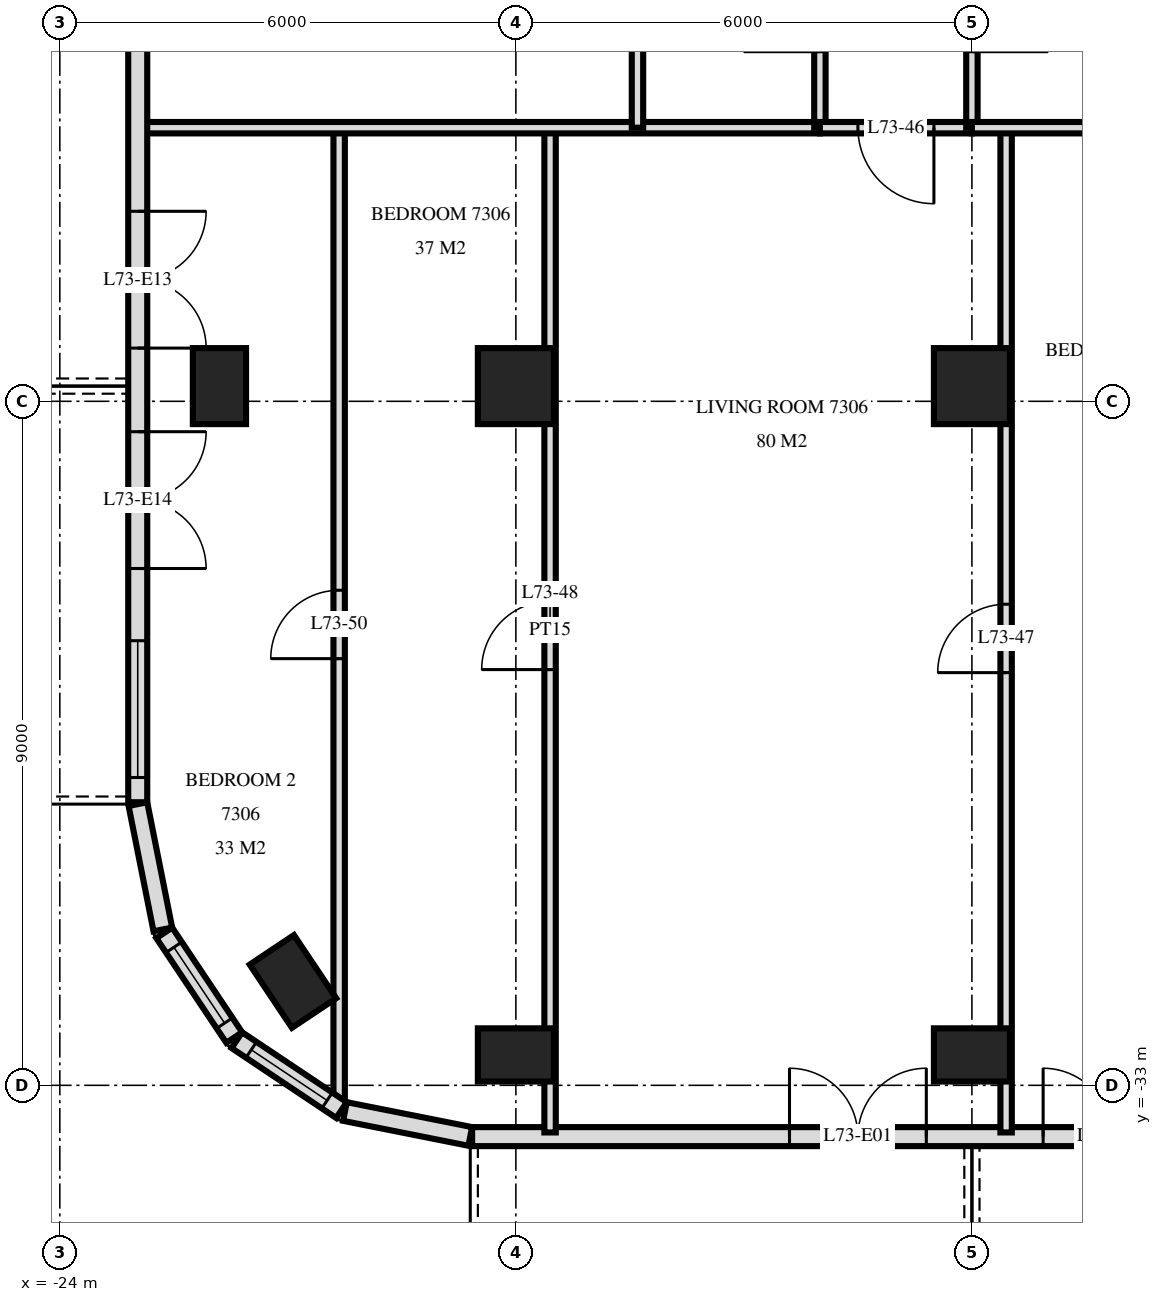
"""IFC4 building model, lengths in metres.
Left out: names, types, materials, properties, quantities, classifications, styles, units other than length and angle.
Written with IfcOpenShell. Run it as: python <this file> out.ifc"""

import sys

from ifc_helpers import new_model, si_unit, direction, frame, frame_2d, origin, origin_2d, place, context, subcontext, project, spatial, rectangle, extrude, element, fill, save


model = new_model("IFC4")
c1 = context("Model", 3, precision=1e-05, world=origin(), true_north=direction((0.0, 1.0)))
c2 = subcontext(c1, "Body", "Model", "MODEL_VIEW")
j1 = project(units=[si_unit("LENGTHUNIT", "METRE"), si_unit("PLANEANGLEUNIT", "RADIAN")], contexts=[c1])
p1 = place(None, origin())
s1 = spatial("IfcSite", under=j1, at=p1, CompositionType="ELEMENT")
p2 = place(p1, origin())
s2 = spatial("IfcBuilding", under=s1, at=p2, CompositionType="ELEMENT")
p3 = place(p2, frame((0.0, 0.0, 277.1)))
s3 = spatial("IfcBuildingStorey", under=s2, at=p3, CompositionType="ELEMENT", Elevation=277.1)
for number, where, z_axis, x_axis in (
    (1, (-21.9, -23.8, 0.0), (0.0, 0.0, 1.0), (0.0, 1.0, 0.0)),
    (2, (-20.933, -31.633, 0.0), (0.0, 0.0, 1.0), (-0.556, 0.831, 0.0)),
    (3, (-18.0, -32.6, 0.0), (0.0, 0.0, 1.0), (1.0, 0.0, 0.0)),
):
    element("IfcColumn", number, at=place(p3, frame(where, z_axis=z_axis, x_axis=x_axis)), inside=s3, PredefinedType="COLUMN", context=c2, shape_type="SweptSolid", body=[
        extrude(rectangle(XDim=1.0, YDim=0.7, at=origin_2d()), origin(), (0.0, 0.0, 1.0), 3.5),
    ])
p4 = place(p3, frame((-18.0, -23.8, 0.0), z_axis=(0.0, 0.0, 1.0), x_axis=(1.0, 0.0, 0.0)))
e4 = element("IfcColumn", 4, at=p4, inside=s3, PredefinedType="COLUMN", context=c2, shape_type="SweptSolid", body=[
    extrude(rectangle(XDim=1.0, YDim=1.0, at=origin_2d()), origin(), (0.0, 0.0, 1.0), 3.5),
])
p5 = place(p3, frame((-12.0, -32.6, 0.0), z_axis=(0.0, 0.0, 1.0), x_axis=(1.0, 0.0, 0.0)))
e5 = element("IfcColumn", 5, at=p5, inside=s3, PredefinedType="COLUMN", context=c2, shape_type="SweptSolid", body=[
    extrude(rectangle(XDim=1.0, YDim=0.7, at=origin_2d()), origin(), (0.0, 0.0, 1.0), 3.5),
])
p6 = place(p3, frame((-12.0, -23.8, 0.0), z_axis=(0.0, 0.0, 1.0), x_axis=(1.0, 0.0, 0.0)))
e6 = element("IfcColumn", 6, at=p6, inside=s3, PredefinedType="COLUMN", context=c2, shape_type="SweptSolid", body=[
    extrude(rectangle(XDim=1.0, YDim=1.0, at=origin_2d()), origin(), (0.0, 0.0, 1.0), 3.5),
])
p7 = place(p3, frame((-22.975, -3.325, 0.0), z_axis=(0.0, 0.0, 1.0), x_axis=(0.0, -1.0, 0.0)))
e7 = element("IfcWall", 7, at=p7, inside=s3, PredefinedType="SOLIDWALL", context=c2, shape_type="SweptSolid", body=[
    extrude(rectangle(XDim=25.951, YDim=0.25, at=frame_2d((12.975, 0.0))), origin(), (0.0, 0.0, 1.0), 3.22),
])
p8 = place(p7, frame((3.225, 0.0, 0.0)))
e8 = element("IfcOpeningElement", 8, at=p8, cuts=e7, PredefinedType="OPENING", context=c2, shape_type="SweptSolid", body=[
    extrude(rectangle(XDim=1.8, YDim=2.4, at=frame_2d((0.9, 1.2))), frame((0.0, 0.135, 0.0), z_axis=(0.0, -1.0, 0.0), x_axis=(1.0, 0.0, 0.0)), (0.0, 0.0, 1.0), 0.27),
])
p9 = place(p7, frame((7.975, 0.0, 0.0)))
e9 = element("IfcOpeningElement", 9, at=p9, cuts=e7, PredefinedType="OPENING", context=c2, shape_type="SweptSolid", body=[
    extrude(rectangle(XDim=1.8, YDim=2.4, at=frame_2d((0.9, 1.2))), frame((0.0, 0.135, 0.0), z_axis=(0.0, -1.0, 0.0), x_axis=(1.0, 0.0, 0.0)), (0.0, 0.0, 1.0), 0.27),
])
p10 = place(p7, frame((12.275, 0.0, 0.9)))
e10 = element("IfcOpeningElement", 10, at=p10, cuts=e7, PredefinedType="OPENING", context=c2, shape_type="SweptSolid", body=[
    extrude(rectangle(XDim=1.2, YDim=1.5, at=frame_2d((0.6, 0.75))), frame((0.0, 0.135, 0.0), z_axis=(0.0, -1.0, 0.0), x_axis=(1.0, 0.0, 0.0)), (0.0, 0.0, 1.0), 0.27),
])
p11 = place(p7, frame((18.175, 0.0, 0.0)))
e11 = element("IfcOpeningElement", 11, at=p11, cuts=e7, PredefinedType="OPENING", context=c2, shape_type="SweptSolid", body=[
    extrude(rectangle(XDim=1.8, YDim=2.4, at=frame_2d((0.9, 1.2))), frame((0.0, 0.135, 0.0), z_axis=(0.0, -1.0, 0.0), x_axis=(1.0, 0.0, 0.0)), (0.0, 0.0, 1.0), 0.27),
])
p12 = place(p7, frame((21.075, 0.0, 0.0)))
e12 = element("IfcOpeningElement", 12, at=p12, cuts=e7, PredefinedType="OPENING", context=c2, shape_type="SweptSolid", body=[
    extrude(rectangle(XDim=1.8, YDim=2.4, at=frame_2d((0.9, 1.2))), frame((0.0, 0.135, 0.0), z_axis=(0.0, -1.0, 0.0), x_axis=(1.0, 0.0, 0.0)), (0.0, 0.0, 1.0), 0.27),
])
p13 = place(p7, frame((23.825, 0.0, 0.9)))
e13 = element("IfcOpeningElement", 13, at=p13, cuts=e7, PredefinedType="OPENING", context=c2, shape_type="SweptSolid", body=[
    extrude(rectangle(XDim=1.8, YDim=1.5, at=frame_2d((0.9, 0.75))), frame((0.0, 0.135, 0.0), z_axis=(0.0, -1.0, 0.0), x_axis=(1.0, 0.0, 0.0)), (0.0, 0.0, 1.0), 0.27),
])
p14 = place(p3, frame((-22.973, -29.3, 0.0), z_axis=(0.0, 0.0, 1.0), x_axis=(0.19513878023, -0.980775640221, 0.0)))
e14 = element("IfcWall", 14, at=p14, inside=s3, PredefinedType="SOLIDWALL", context=c2, shape_type="SweptSolid", body=[
    extrude(rectangle(XDim=1.681, YDim=0.25, at=frame_2d((0.841, 0.0))), origin(), (0.0, 0.0, 1.0), 3.22),
])
p15 = place(p3, frame((-22.626, -30.994, 0.0), z_axis=(0.0, 0.0, 1.0), x_axis=(0.55555029066, -0.831482937015, 0.0)))
e15 = element("IfcWall", 15, at=p15, inside=s3, PredefinedType="SOLIDWALL", context=c2, shape_type="SweptSolid", body=[
    extrude(rectangle(XDim=1.656, YDim=0.25, at=frame_2d((0.828, 0.0))), origin(), (0.0, 0.0, 1.0), 3.22),
])
p16 = place(p15, frame((0.228, 0.0, 0.9)))
e16 = element("IfcOpeningElement", 16, at=p16, cuts=e15, PredefinedType="OPENING", context=c2, shape_type="SweptSolid", body=[
    extrude(rectangle(XDim=1.2, YDim=1.5, at=frame_2d((0.6, 0.75))), frame((0.0, 0.135, 0.0), z_axis=(0.0, -1.0, 0.0), x_axis=(1.0, 0.0, 0.0)), (0.0, 0.0, 1.0), 0.27),
])
p17 = place(p3, frame((-21.671, -32.406, 0.0), z_axis=(0.0, 0.0, 1.0), x_axis=(0.831482937015, -0.55555029066, 0.0)))
e17 = element("IfcWall", 17, at=p17, inside=s3, PredefinedType="SOLIDWALL", context=c2, shape_type="SweptSolid", body=[
    extrude(rectangle(XDim=1.656, YDim=0.25, at=frame_2d((0.828, 0.0))), origin(), (0.0, 0.0, 1.0), 3.22),
])
p18 = place(p17, frame((0.228, 0.0, 0.9)))
e18 = element("IfcOpeningElement", 18, at=p18, cuts=e17, PredefinedType="OPENING", context=c2, shape_type="SweptSolid", body=[
    extrude(rectangle(XDim=1.2, YDim=1.5, at=frame_2d((0.6, 0.75))), frame((0.0, 0.135, 0.0), z_axis=(0.0, -1.0, 0.0), x_axis=(1.0, 0.0, 0.0)), (0.0, 0.0, 1.0), 0.27),
])
p19 = place(p3, frame((-20.249, -33.344, 0.0), z_axis=(0.0, 0.0, 1.0), x_axis=(0.980770110232, -0.195166572128, 0.0)))
e19 = element("IfcWall", 19, at=p19, inside=s3, PredefinedType="SOLIDWALL", context=c2, shape_type="SweptSolid", body=[
    extrude(rectangle(XDim=1.681, YDim=0.25, at=frame_2d((0.841, 0.0))), origin(), (0.0, 0.0, 1.0), 3.22),
])
p20 = place(p3, frame((-18.575, -33.675, 0.0), z_axis=(0.0, 0.0, 1.0), x_axis=(1.0, 0.0, 0.0)))
e20 = element("IfcWall", 20, at=p20, inside=s3, PredefinedType="SOLIDWALL", context=c2, shape_type="SweptSolid", body=[
    extrude(rectangle(XDim=37.151, YDim=0.25, at=frame_2d((18.575, 0.0))), origin(), (0.0, 0.0, 1.0), 3.22),
])
p21 = place(p20, frame((4.175, 0.0, 0.0)))
e21 = element("IfcOpeningElement", 21, at=p21, cuts=e20, PredefinedType="OPENING", context=c2, shape_type="SweptSolid", body=[
    extrude(rectangle(XDim=1.8, YDim=2.4, at=frame_2d((0.9, 1.2))), frame((0.0, 0.135, 0.0), z_axis=(0.0, -1.0, 0.0), x_axis=(1.0, 0.0, 0.0)), (0.0, 0.0, 1.0), 0.27),
])
p22 = place(p20, frame((7.512, 0.0, 0.0)))
e22 = element("IfcOpeningElement", 22, at=p22, cuts=e20, PredefinedType="OPENING", context=c2, shape_type="SweptSolid", body=[
    extrude(rectangle(XDim=1.8, YDim=2.4, at=frame_2d((0.9, 1.2))), frame((0.0, 0.135, 0.0), z_axis=(0.0, -1.0, 0.0), x_axis=(1.0, 0.0, 0.0)), (0.0, 0.0, 1.0), 0.27),
])
p23 = place(p20, frame((10.287, 0.0, 0.9)))
e23 = element("IfcOpeningElement", 23, at=p23, cuts=e20, PredefinedType="OPENING", context=c2, shape_type="SweptSolid", body=[
    extrude(rectangle(XDim=1.8, YDim=1.5, at=frame_2d((0.9, 0.75))), frame((0.0, 0.135, 0.0), z_axis=(0.0, -1.0, 0.0), x_axis=(1.0, 0.0, 0.0)), (0.0, 0.0, 1.0), 0.27),
])
p24 = place(p20, frame((12.875, 0.0, 0.9)))
e24 = element("IfcOpeningElement", 24, at=p24, cuts=e20, PredefinedType="OPENING", context=c2, shape_type="SweptSolid", body=[
    extrude(rectangle(XDim=2.4, YDim=1.5, at=frame_2d((1.2, 0.75))), frame((0.0, 0.135, 0.0), z_axis=(0.0, -1.0, 0.0), x_axis=(1.0, 0.0, 0.0)), (0.0, 0.0, 1.0), 0.27),
])
p25 = place(p20, frame((16.175, 0.0, 0.0)))
e25 = element("IfcOpeningElement", 25, at=p25, cuts=e20, PredefinedType="OPENING", context=c2, shape_type="SweptSolid", body=[
    extrude(rectangle(XDim=1.8, YDim=2.4, at=frame_2d((0.9, 1.2))), frame((0.0, 0.135, 0.0), z_axis=(0.0, -1.0, 0.0), x_axis=(1.0, 0.0, 0.0)), (0.0, 0.0, 1.0), 0.27),
])
p26 = place(p20, frame((19.175, 0.0, 0.0)))
e26 = element("IfcOpeningElement", 26, at=p26, cuts=e20, PredefinedType="OPENING", context=c2, shape_type="SweptSolid", body=[
    extrude(rectangle(XDim=1.8, YDim=2.4, at=frame_2d((0.9, 1.2))), frame((0.0, 0.135, 0.0), z_axis=(0.0, -1.0, 0.0), x_axis=(1.0, 0.0, 0.0)), (0.0, 0.0, 1.0), 0.27),
])
p27 = place(p20, frame((21.875, 0.0, 0.9)))
e27 = element("IfcOpeningElement", 27, at=p27, cuts=e20, PredefinedType="OPENING", context=c2, shape_type="SweptSolid", body=[
    extrude(rectangle(XDim=2.4, YDim=1.5, at=frame_2d((1.2, 0.75))), frame((0.0, 0.135, 0.0), z_axis=(0.0, -1.0, 0.0), x_axis=(1.0, 0.0, 0.0)), (0.0, 0.0, 1.0), 0.27),
])
p28 = place(p20, frame((25.175, 0.0, 0.0)))
e28 = element("IfcOpeningElement", 28, at=p28, cuts=e20, PredefinedType="OPENING", context=c2, shape_type="SweptSolid", body=[
    extrude(rectangle(XDim=1.8, YDim=2.4, at=frame_2d((0.9, 1.2))), frame((0.0, 0.135, 0.0), z_axis=(0.0, -1.0, 0.0), x_axis=(1.0, 0.0, 0.0)), (0.0, 0.0, 1.0), 0.27),
])
p29 = place(p20, frame((27.875, 0.0, 0.9)))
e29 = element("IfcOpeningElement", 29, at=p29, cuts=e20, PredefinedType="OPENING", context=c2, shape_type="SweptSolid", body=[
    extrude(rectangle(XDim=2.4, YDim=1.5, at=frame_2d((1.2, 0.75))), frame((0.0, 0.135, 0.0), z_axis=(0.0, -1.0, 0.0), x_axis=(1.0, 0.0, 0.0)), (0.0, 0.0, 1.0), 0.27),
])
p30 = place(p20, frame((30.95, 0.0, 0.9)))
e30 = element("IfcOpeningElement", 30, at=p30, cuts=e20, PredefinedType="OPENING", context=c2, shape_type="SweptSolid", body=[
    extrude(rectangle(XDim=1.8, YDim=1.5, at=frame_2d((0.9, 0.75))), frame((0.0, 0.135, 0.0), z_axis=(0.0, -1.0, 0.0), x_axis=(1.0, 0.0, 0.0)), (0.0, 0.0, 1.0), 0.27),
])
p31 = place(p20, frame((34.175, 0.0, 0.0)))
e31 = element("IfcOpeningElement", 31, at=p31, cuts=e20, PredefinedType="OPENING", context=c2, shape_type="SweptSolid", body=[
    extrude(rectangle(XDim=1.8, YDim=2.4, at=frame_2d((0.9, 1.2))), frame((0.0, 0.135, 0.0), z_axis=(0.0, -1.0, 0.0), x_axis=(1.0, 0.0, 0.0)), (0.0, 0.0, 1.0), 0.27),
])
p32 = place(p3, frame((-11.55, -33.62, 0.0), z_axis=(0.0, 0.0, 1.0), x_axis=(0.0, 1.0, 0.0)))
e32 = element("IfcWall", 32, at=p32, inside=s3, PredefinedType="PARTITIONING", context=c2, shape_type="SweptSolid", body=[
    extrude(rectangle(XDim=13.22, YDim=0.15, at=frame_2d((6.61, 0.0))), origin(), (0.0, 0.0, 1.0), 3.22),
])
p33 = place(p32, frame((6.05, 0.0, 0.0)))
e33 = element("IfcOpeningElement", 33, at=p33, cuts=e32, PredefinedType="OPENING", context=c2, shape_type="SweptSolid", body=[
    extrude(rectangle(XDim=0.9, YDim=2.1, at=frame_2d((0.45, 1.05))), frame((0.0, 0.085, 0.0), z_axis=(0.0, -1.0, 0.0), x_axis=(1.0, 0.0, 0.0)), (0.0, 0.0, 1.0), 0.17),
])
p34 = place(p3, frame((-12.0, -20.4, 0.0), z_axis=(0.0, 0.0, 1.0), x_axis=(0.0, 1.0, 0.0)))
e34 = element("IfcWall", 34, at=p34, inside=s3, PredefinedType="PARTITIONING", context=c2, shape_type="SweptSolid", body=[
    extrude(rectangle(XDim=3.0, YDim=0.15, at=frame_2d((1.5, 0.0))), origin(), (0.0, 0.0, 1.0), 3.22),
])
p35 = place(p34, frame((1.0, 0.0, 0.0)))
e35 = element("IfcOpeningElement", 35, at=p35, cuts=e34, PredefinedType="OPENING", context=c2, shape_type="SweptSolid", body=[
    extrude(rectangle(XDim=1.0, YDim=2.1, at=frame_2d((0.5, 1.05))), frame((0.0, 0.085, 0.0), z_axis=(0.0, -1.0, 0.0), x_axis=(1.0, 0.0, 0.0)), (0.0, 0.0, 1.0), 0.17),
])
p36 = place(p3, frame((-14.0, -20.4, 0.0), z_axis=(0.0, 0.0, 1.0), x_axis=(0.0, 1.0, 0.0)))
e36 = element("IfcWall", 36, at=p36, inside=s3, PredefinedType="PARTITIONING", context=c2, shape_type="SweptSolid", body=[
    extrude(rectangle(XDim=3.0, YDim=0.15, at=frame_2d((1.5, 0.0))), origin(), (0.0, 0.0, 1.0), 3.22),
])
p37 = place(p36, frame((1.0, 0.0, 0.0)))
e37 = element("IfcOpeningElement", 37, at=p37, cuts=e36, PredefinedType="OPENING", context=c2, shape_type="SweptSolid", body=[
    extrude(rectangle(XDim=1.0, YDim=2.1, at=frame_2d((0.5, 1.05))), frame((0.0, 0.085, 0.0), z_axis=(0.0, -1.0, 0.0), x_axis=(1.0, 0.0, 0.0)), (0.0, 0.0, 1.0), 0.17),
])
p38 = place(p3, frame((-16.4, -20.4, 0.0), z_axis=(0.0, 0.0, 1.0), x_axis=(0.0, 1.0, 0.0)))
e38 = element("IfcWall", 38, at=p38, inside=s3, PredefinedType="PARTITIONING", context=c2, shape_type="SweptSolid", body=[
    extrude(rectangle(XDim=3.0, YDim=0.15, at=frame_2d((1.5, 0.0))), origin(), (0.0, 0.0, 1.0), 3.22),
])
p39 = place(p3, frame((-17.55, -33.62, 0.0), z_axis=(0.0, 0.0, 1.0), x_axis=(0.0, 1.0, 0.0)))
e39 = element("IfcWall", 39, at=p39, inside=s3, PredefinedType="PARTITIONING", context=c2, shape_type="SweptSolid", body=[
    extrude(rectangle(XDim=13.22, YDim=0.15, at=frame_2d((6.61, 0.0))), origin(), (0.0, 0.0, 1.0), 3.22),
])
p40 = place(p39, frame((6.09, 0.0, 0.0)))
e40 = element("IfcOpeningElement", 40, at=p40, cuts=e39, PredefinedType="OPENING", context=c2, shape_type="SweptSolid", body=[
    extrude(rectangle(XDim=0.9, YDim=2.1, at=frame_2d((0.45, 1.05))), frame((0.0, 0.085, 0.0), z_axis=(0.0, -1.0, 0.0), x_axis=(1.0, 0.0, 0.0)), (0.0, 0.0, 1.0), 0.17),
])
p41 = place(p3, frame((-20.325, -33.239, 0.0), z_axis=(0.0, 0.0, 1.0), x_axis=(0.0, 1.0, 0.0)))
e41 = element("IfcWall", 41, at=p41, inside=s3, PredefinedType="PARTITIONING", context=c2, shape_type="SweptSolid", body=[
    extrude(rectangle(XDim=12.839, YDim=0.15, at=frame_2d((6.419, 0.0))), origin(), (0.0, 0.0, 1.0), 3.22),
])
p42 = place(p41, frame((5.853, 0.0, 0.0)))
e42 = element("IfcOpeningElement", 42, at=p42, cuts=e41, PredefinedType="OPENING", context=c2, shape_type="SweptSolid", body=[
    extrude(rectangle(XDim=0.9, YDim=2.1, at=frame_2d((0.45, 1.05))), frame((0.0, 0.085, 0.0), z_axis=(0.0, -1.0, 0.0), x_axis=(1.0, 0.0, 0.0)), (0.0, 0.0, 1.0), 0.17),
])
p43 = place(p3, frame((-14.0, -20.4, 0.0), z_axis=(0.0, 0.0, 1.0), x_axis=(1.0, 0.0, 0.0)))
e43 = element("IfcWall", 43, at=p43, inside=s3, PredefinedType="PARTITIONING", context=c2, shape_type="SweptSolid", body=[
    extrude(rectangle(XDim=2.0, YDim=0.15, at=frame_2d((1.0, 0.0))), origin(), (0.0, 0.0, 1.0), 3.22),
])
p44 = place(p43, frame((0.5, 0.0, 0.0)))
e44 = element("IfcOpeningElement", 44, at=p44, cuts=e43, PredefinedType="OPENING", context=c2, shape_type="SweptSolid", body=[
    extrude(rectangle(XDim=1.0, YDim=2.1, at=frame_2d((0.5, 1.05))), frame((0.0, 0.085, 0.0), z_axis=(0.0, -1.0, 0.0), x_axis=(1.0, 0.0, 0.0)), (0.0, 0.0, 1.0), 0.17),
])
p45 = place(p3, frame((-22.92, -20.4, 0.0), z_axis=(0.0, 0.0, 1.0), x_axis=(1.0, 0.0, 0.0)))
e45 = element("IfcWall", 45, at=p45, inside=s3, PredefinedType="PARTITIONING", context=c2, shape_type="SweptSolid", body=[
    extrude(rectangle(XDim=8.92, YDim=0.15, at=frame_2d((4.46, 0.0))), origin(), (0.0, 0.0, 1.0), 3.22),
])
p46 = place(p3, frame((-12.0, -20.4, 0.0), z_axis=(0.0, 0.0, 1.0), x_axis=(1.0, 0.0, 0.0)))
e46 = element("IfcWall", 46, at=p46, inside=s3, PredefinedType="PARTITIONING", context=c2, shape_type="SweptSolid", body=[
    extrude(rectangle(XDim=6.0, YDim=0.15, at=frame_2d((3.0, 0.0))), origin(), (0.0, 0.0, 1.0), 3.22),
])
p47 = place(p46, frame((4.4, 0.0, 0.0)))
e47 = element("IfcOpeningElement", 47, at=p47, cuts=e46, PredefinedType="OPENING", context=c2, shape_type="SweptSolid", body=[
    extrude(rectangle(XDim=0.8, YDim=2.1, at=frame_2d((0.4, 1.05))), frame((0.0, 0.085, 0.0), z_axis=(0.0, -1.0, 0.0), x_axis=(1.0, 0.0, 0.0)), (0.0, 0.0, 1.0), 0.17),
])
p48 = place(p16, origin())
e48 = element("IfcWindow", 48, at=p48, inside=s3, PartitioningType="SINGLE_PANEL", PredefinedType="WINDOW", context=c2, shape_type="SweptSolid", body=[
    extrude(rectangle(XDim=1.2, YDim=1.5, at=frame_2d((0.6, 0.75))), frame((0.0, 0.03, 0.0), z_axis=(0.0, -1.0, 0.0), x_axis=(1.0, 0.0, 0.0)), (0.0, 0.0, 1.0), 0.06),
])
fill(e16, e48)
p49 = place(p18, origin())
e49 = element("IfcWindow", 49, at=p49, inside=s3, PartitioningType="SINGLE_PANEL", PredefinedType="WINDOW", context=c2, shape_type="SweptSolid", body=[
    extrude(rectangle(XDim=1.2, YDim=1.5, at=frame_2d((0.6, 0.75))), frame((0.0, 0.03, 0.0), z_axis=(0.0, -1.0, 0.0), x_axis=(1.0, 0.0, 0.0)), (0.0, 0.0, 1.0), 0.06),
])
fill(e18, e49)
p50 = place(p21, origin())
e50 = element("IfcDoor", 50, at=p50, inside=s3, OperationType="DOUBLE_DOOR_SINGLE_SWING", PredefinedType="DOOR", context=c2, shape_type="SweptSolid", body=[
    extrude(rectangle(XDim=1.8, YDim=2.4, at=frame_2d((0.9, 1.2))), frame((0.0, 0.025, 0.0), z_axis=(0.0, -1.0, 0.0), x_axis=(1.0, 0.0, 0.0)), (0.0, 0.0, 1.0), 0.05),
])
fill(e21, e50)
p51 = place(p22, origin())
e51 = element("IfcDoor", 51, at=p51, inside=s3, OperationType="DOUBLE_DOOR_SINGLE_SWING", PredefinedType="DOOR", context=c2, shape_type="SweptSolid", body=[
    extrude(rectangle(XDim=1.8, YDim=2.4, at=frame_2d((0.9, 1.2))), frame((0.0, 0.025, 0.0), z_axis=(0.0, -1.0, 0.0), x_axis=(1.0, 0.0, 0.0)), (0.0, 0.0, 1.0), 0.05),
])
fill(e22, e51)
p52 = place(p11, origin())
e52 = element("IfcDoor", 52, at=p52, inside=s3, OperationType="DOUBLE_DOOR_SINGLE_SWING", PredefinedType="DOOR", context=c2, shape_type="SweptSolid", body=[
    extrude(rectangle(XDim=1.8, YDim=2.4, at=frame_2d((0.9, 1.2))), frame((0.0, 0.025, 0.0), z_axis=(0.0, -1.0, 0.0), x_axis=(1.0, 0.0, 0.0)), (0.0, 0.0, 1.0), 0.05),
])
fill(e11, e52)
p53 = place(p12, origin())
e53 = element("IfcDoor", 53, at=p53, inside=s3, OperationType="DOUBLE_DOOR_SINGLE_SWING", PredefinedType="DOOR", context=c2, shape_type="SweptSolid", body=[
    extrude(rectangle(XDim=1.8, YDim=2.4, at=frame_2d((0.9, 1.2))), frame((0.0, 0.025, 0.0), z_axis=(0.0, -1.0, 0.0), x_axis=(1.0, 0.0, 0.0)), (0.0, 0.0, 1.0), 0.05),
])
fill(e12, e53)
p54 = place(p13, origin())
e54 = element("IfcWindow", 54, at=p54, inside=s3, PartitioningType="SINGLE_PANEL", PredefinedType="WINDOW", context=c2, shape_type="SweptSolid", body=[
    extrude(rectangle(XDim=1.8, YDim=1.5, at=frame_2d((0.9, 0.75))), frame((0.0, 0.03, 0.0), z_axis=(0.0, -1.0, 0.0), x_axis=(1.0, 0.0, 0.0)), (0.0, 0.0, 1.0), 0.06),
])
fill(e13, e54)
p55 = place(p44, frame((0.5, 0.0, 0.0), z_axis=(0.0, 0.0, 1.0), x_axis=(-1.0, 0.0, 0.0)))
e55 = element("IfcDoor", 55, at=p55, inside=s3, OperationType="SINGLE_SWING_RIGHT", PredefinedType="DOOR", context=c2, shape_type="SweptSolid", body=[
    extrude(rectangle(XDim=1.0, YDim=2.1, at=frame_2d((0.0, 1.05))), frame((0.0, -0.025, 0.0), z_axis=(0.0, 1.0, 0.0), x_axis=(-1.0, 0.0, 0.0)), (0.0, 0.0, 1.0), 0.05),
])
fill(e44, e55)
p56 = place(p33, origin())
e56 = element("IfcDoor", 56, at=p56, inside=s3, OperationType="SINGLE_SWING_RIGHT", PredefinedType="DOOR", context=c2, shape_type="SweptSolid", body=[
    extrude(rectangle(XDim=0.9, YDim=2.1, at=frame_2d((0.45, 1.05))), frame((0.0, 0.025, 0.0), z_axis=(0.0, -1.0, 0.0), x_axis=(1.0, 0.0, 0.0)), (0.0, 0.0, 1.0), 0.05),
])
fill(e33, e56)
p57 = place(p40, origin())
e57 = element("IfcDoor", 57, at=p57, inside=s3, OperationType="SINGLE_SWING_RIGHT", PredefinedType="DOOR", context=c2, shape_type="SweptSolid", body=[
    extrude(rectangle(XDim=0.9, YDim=2.1, at=frame_2d((0.45, 1.05))), frame((0.0, 0.025, 0.0), z_axis=(0.0, -1.0, 0.0), x_axis=(1.0, 0.0, 0.0)), (0.0, 0.0, 1.0), 0.05),
])
fill(e40, e57)
p58 = place(p42, origin())
e58 = element("IfcDoor", 58, at=p58, inside=s3, OperationType="SINGLE_SWING_RIGHT", PredefinedType="DOOR", context=c2, shape_type="SweptSolid", body=[
    extrude(rectangle(XDim=0.9, YDim=2.1, at=frame_2d((0.45, 1.05))), frame((0.0, 0.025, 0.0), z_axis=(0.0, -1.0, 0.0), x_axis=(1.0, 0.0, 0.0)), (0.0, 0.0, 1.0), 0.05),
])
fill(e42, e58)
save(model, sys.argv[1])
